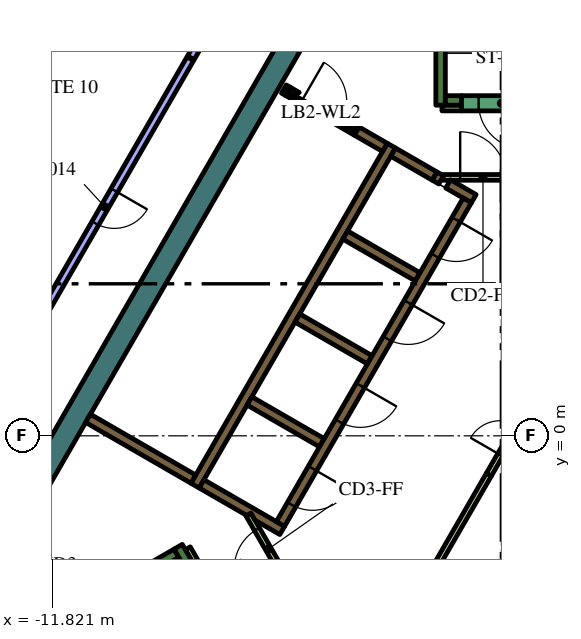
"""IFC4 building model, lengths in metres.
Left out: names, types, materials, properties, quantities, classifications, styles, units other than length and angle.
Written with IfcOpenShell. Run it as: python <this file> out.ifc"""

import sys

from ifc_helpers import new_model, si_unit, direction, frame, frame_2d, origin, place, context, subcontext, project, spatial, polyline, rectangle, outline, extrude, element, fill, save


model = new_model("IFC4")
c1 = context("Model", 3, precision=1e-05, world=origin(), true_north=direction((0.0, 1.0)))
c2 = subcontext(c1, "Body", "Model", "MODEL_VIEW")
j1 = project(units=[si_unit("LENGTHUNIT", "METRE"), si_unit("PLANEANGLEUNIT", "RADIAN")], contexts=[c1])
p1 = place(None, origin())
s1 = spatial("IfcSite", under=j1, at=p1, CompositionType="ELEMENT")
p2 = place(p1, origin())
s2 = spatial("IfcBuilding", under=s1, at=p2, CompositionType="ELEMENT")
p3 = place(p2, frame((0.0, 0.0, 309.0)))
s3 = spatial("IfcBuildingStorey", under=s2, at=p3, CompositionType="ELEMENT", Elevation=309.0)
p4 = place(p3, frame((-12.582, -1.892, 0.0), z_axis=(0.0, 0.0, 1.0), x_axis=(0.500003640647, 0.866023301845, 0.0)))
e1 = element("IfcWall", 1, at=p4, inside=s3, PredefinedType="SOLIDWALL", context=c2, shape_type="SweptSolid", body=[
    extrude(rectangle(XDim=15.858, YDim=0.6, at=frame_2d((7.929, 0.0))), origin(), (0.0, 0.0, 1.0), 4.2),
])
p5 = place(p3, frame((-1.6, 8.7, 0.0), z_axis=(0.0, 0.0, 1.0), x_axis=(0.0, 1.0, 0.0)))
e2 = element("IfcWall", 2, at=p5, inside=s3, PredefinedType="SOLIDWALL", context=c2, shape_type="SweptSolid", body=[
    extrude(rectangle(XDim=7.05, YDim=0.25, at=frame_2d((3.525, 0.0))), origin(), (0.0, 0.0, 1.0), 4.2),
])
p6 = place(p3, frame((-1.475, 8.825, 0.0), z_axis=(0.0, 0.0, 1.0), x_axis=(1.0, 0.0, 0.0)))
e3 = element("IfcWall", 3, at=p6, inside=s3, PredefinedType="SOLIDWALL", context=c2, shape_type="SweptSolid", body=[
    extrude(rectangle(XDim=0.425, YDim=0.25, at=frame_2d((0.212, 0.0))), origin(), (0.0, 0.0, 1.0), 4.2),
])
p7 = place(p3, frame((-14.44, -6.49, 0.0), z_axis=(0.0, 0.0, 1.0), x_axis=(0.866022966069, 0.500004222222, 0.0)))
e4 = element("IfcWall", 4, at=p7, inside=s3, PredefinedType="SOLIDWALL", context=c2, shape_type="SweptSolid", body=[
    extrude(rectangle(XDim=6.8, YDim=0.25, at=frame_2d((3.4, 0.0))), origin(), (0.0, 0.0, 1.0), 4.2),
])
p8 = place(p3, frame((-8.168, -3.503, 0.0), z_axis=(0.0, 0.0, 1.0), x_axis=(-0.499952099219, 0.866053057547, 0.0)))
e5 = element("IfcWall", 5, at=p8, inside=s3, PredefinedType="SOLIDWALL", context=c2, shape_type="SweptSolid", body=[
    extrude(rectangle(XDim=0.675, YDim=0.25, at=frame_2d((0.337, 0.0))), origin(), (0.0, 0.0, 1.0), 4.2),
])
p9 = place(p3, frame((-8.06, -1.311, 0.0), z_axis=(0.0, 0.0, 1.0), x_axis=(0.50000273126, 0.866023826885, 0.0)))
e6 = element("IfcWall", 6, at=p9, inside=s3, PredefinedType="SOLIDWALL", context=c2, shape_type="SweptSolid", body=[
    extrude(rectangle(XDim=10.33, YDim=0.25, at=frame_2d((5.165, 0.0))), origin(), (0.0, 0.0, 1.0), 4.2),
])
p10 = place(p3, frame((-1.758, 6.835, 0.0), z_axis=(0.0, 0.0, 1.0), x_axis=(0.865982457891, -0.500074377092, 0.0)))
e7 = element("IfcWall", 7, at=p10, inside=s3, PredefinedType="SOLIDWALL", context=c2, shape_type="SweptSolid", body=[
    extrude(rectangle(XDim=0.2, YDim=0.25, at=frame_2d((0.1, 0.0))), origin(), (0.0, 0.0, 1.0), 4.2),
])
p11 = place(p3, frame((-1.76, 6.836, 0.0), z_axis=(0.0, 0.0, 1.0), x_axis=(-0.865952863304, 0.500125622755, 0.0)))
e8 = element("IfcWall", 8, at=p11, inside=s3, PredefinedType="SOLIDWALL", context=c2, shape_type="SweptSolid", body=[
    extrude(rectangle(XDim=1.258, YDim=0.25, at=frame_2d((0.629, 0.0))), origin(), (0.0, 0.0, 1.0), 4.2),
])
p12 = place(p3, frame((-0.728, 6.24, 0.0), z_axis=(0.0, 0.0, 1.0), x_axis=(-0.865955664968, 0.500120771724, 0.0)))
e9 = element("IfcWall", 9, at=p12, inside=s3, PredefinedType="SOLIDWALL", context=c2, shape_type="SweptSolid", body=[
    extrude(rectangle(XDim=0.778, YDim=0.25, at=frame_2d((0.389, 0.0))), origin(), (0.0, 0.0, 1.0), 4.2),
])
for number, where, z_axis, x_axis in (
    (10, (-2.204, 4.182, 0.0), (0.0, 0.0, 1.0), (-0.866, 0.5, 0.0)),
    (11, (-5.369, 3.1, 0.0), (0.0, 0.0, 1.0), (0.866, -0.5, 0.0)),
    (12, (-4.724, -0.182, 0.0), (0.0, 0.0, 1.0), (-0.866, 0.5, 0.0)),
):
    element("IfcWall", number, at=place(p3, frame(where, z_axis=z_axis, x_axis=x_axis)), inside=s3, PredefinedType="SOLIDWALL", context=c2, shape_type="SweptSolid", body=[
        extrude(rectangle(XDim=2.2, YDim=0.25, at=frame_2d((1.1, 0.0))), origin(), (0.0, 0.0, 1.0), 4.2),
    ])
p13 = place(p3, origin())
e13 = element("IfcWall", 13, at=p13, inside=s3, PredefinedType="SOLIDWALL", context=c2, shape_type="SweptSolid", body=[
    extrude(outline(polyline([(-5.922, -2.257), (-5.922, -2.257), (-5.705, -2.382), (-5.83, -2.598), (-6.483, -2.221), (-6.591, -2.033), (-6.591, -2.033), (-6.7, -2.096), (-7.952, -1.373), (-7.827, -1.156), (-5.922, -2.257)])), origin(), (0.0, 0.0, 1.0), 4.2),
])
p14 = place(p3, frame((-8.106, -1.14, 0.0), z_axis=(0.0, 0.0, 1.0), x_axis=(-0.866008981251, 0.500028443584, 0.0)))
e14 = element("IfcWall", 14, at=p14, inside=s3, PredefinedType="SOLIDWALL", context=c2, shape_type="SweptSolid", body=[
    extrude(rectangle(XDim=3.2, YDim=0.25, at=frame_2d((1.6, 0.0))), origin(), (0.0, 0.0, 1.0), 4.2),
])
p15 = place(p3, frame((-5.725, 9.125, 0.0), z_axis=(0.0, 0.0, 1.0), x_axis=(0.866185586049, -0.49972245349, 0.0)))
e15 = element("IfcWall", 15, at=p15, inside=s3, PredefinedType="SOLIDWALL", context=c2, shape_type="SweptSolid", body=[
    extrude(rectangle(XDim=0.11, YDim=0.25, at=frame_2d((0.055, 0.0))), origin(), (0.0, 0.0, 1.0), 4.2),
])
p16 = place(p3, frame((-3.066, 7.59, 0.0), z_axis=(0.0, 0.0, 1.0), x_axis=(-0.866081358704, 0.49990307071, 0.0)))
e16 = element("IfcWall", 16, at=p16, inside=s3, PredefinedType="SOLIDWALL", context=c2, shape_type="SweptSolid", body=[
    extrude(rectangle(XDim=0.858, YDim=0.25, at=frame_2d((0.429, 0.0))), origin(), (0.0, 0.0, 1.0), 4.2),
])
e17 = element("IfcWall", 17, at=p13, inside=s3, PredefinedType="SOLIDWALL", context=c2, shape_type="SweptSolid", body=[
    extrude(outline(polyline([(-3.748, 8.128), (-3.813, 8.015), (-4.027, 8.139), (-4.017, 8.156), (-4.008, 8.173), (-4.0, 8.192), (-3.995, 8.21), (-3.991, 8.23), (-3.99, 8.25), (-3.99, 8.268), (-3.748, 8.128)])), origin(), (0.0, 0.0, 1.0), 4.2),
])
e18 = element("IfcWall", 18, at=p13, inside=s3, PredefinedType="SOLIDWALL", context=c2, shape_type="SweptSolid", body=[
    extrude(outline(polyline([(-5.689, 8.96), (-5.69, 8.961), (-5.565, 9.177), (-5.319, 9.035), (-5.335, 9.026), (-5.351, 9.015), (-5.366, 9.002), (-5.379, 8.988), (-5.392, 8.972), (-5.402, 8.956), (-5.412, 8.939), (-5.629, 9.064), (-5.629, 9.064), (-5.689, 8.96)])), origin(), (0.0, 0.0, 1.0), 4.2),
])
for number, where, z_axis, x_axis in (
    (19, (-8.252, -2.958, 0.0), (0.0, 0.0, 1.0), (0.5, -0.866, 0.0)),
    (20, (-1.564, 8.625, 0.0), (0.0, 0.0, 1.0), (1.0, 0.0, 0.0)),
):
    element("IfcWall", number, at=place(p3, frame(where, z_axis=z_axis, x_axis=x_axis)), inside=s3, PredefinedType="PARTITIONING", context=c2, shape_type="SweptSolid", body=[
        extrude(rectangle(XDim=0.514, YDim=0.15, at=frame_2d((0.257, 0.0))), origin(), (0.0, 0.0, 1.0), 3.55),
    ])
p17 = place(p3, frame((-1.887, -3.718, 0.0), z_axis=(0.0, 0.0, 1.0), x_axis=(0.500043732237, 0.866000153493, 0.0)))
e21 = element("IfcWall", 21, at=p17, inside=s3, PredefinedType="PARTITIONING", context=c2, shape_type="SweptSolid", body=[
    extrude(rectangle(XDim=3.114, YDim=0.15, at=frame_2d((1.557, 0.0))), origin(), (0.0, 0.0, 1.0), 3.55),
])
p18 = place(p3, frame((-0.898, 6.194, 0.0), z_axis=(0.0, 0.0, 1.0), x_axis=(-0.499996202215, -0.866027596426, 0.0)))
e22 = element("IfcWall", 22, at=p18, inside=s3, PredefinedType="SOLIDWALL", context=c2, shape_type="SweptSolid", body=[
    extrude(rectangle(XDim=9.83, YDim=0.25, at=frame_2d((4.915, 0.0))), origin(), (0.0, 0.0, 1.0), 4.2),
])
p19 = place(p18, frame((0.585, 0.0, 0.0)))
e23 = element("IfcOpeningElement", 23, at=p19, cuts=e22, PredefinedType="OPENING", context=c2, shape_type="SweptSolid", body=[
    extrude(rectangle(XDim=1.1, YDim=2.1, at=frame_2d((0.55, 1.05))), frame((0.0, 0.135, 0.0), z_axis=(0.0, -1.0, 0.0), x_axis=(1.0, 0.0, 0.0)), (0.0, 0.0, 1.0), 0.27),
])
p20 = place(p18, frame((3.105, 0.0, 0.0)))
e24 = element("IfcOpeningElement", 24, at=p20, cuts=e22, PredefinedType="OPENING", context=c2, shape_type="SweptSolid", body=[
    extrude(rectangle(XDim=1.1, YDim=2.1, at=frame_2d((0.55, 1.05))), frame((0.0, 0.135, 0.0), z_axis=(0.0, -1.0, 0.0), x_axis=(1.0, 0.0, 0.0)), (0.0, 0.0, 1.0), 0.27),
])
p21 = place(p18, frame((5.625, 0.0, 0.0)))
e25 = element("IfcOpeningElement", 25, at=p21, cuts=e22, PredefinedType="OPENING", context=c2, shape_type="SweptSolid", body=[
    extrude(rectangle(XDim=1.1, YDim=2.1, at=frame_2d((0.55, 1.05))), frame((0.0, 0.135, 0.0), z_axis=(0.0, -1.0, 0.0), x_axis=(1.0, 0.0, 0.0)), (0.0, 0.0, 1.0), 0.27),
])
p22 = place(p18, frame((8.145, 0.0, 0.0)))
e26 = element("IfcOpeningElement", 26, at=p22, cuts=e22, PredefinedType="OPENING", context=c2, shape_type="SweptSolid", body=[
    extrude(rectangle(XDim=1.1, YDim=2.1, at=frame_2d((0.55, 1.05))), frame((0.0, 0.135, 0.0), z_axis=(0.0, -1.0, 0.0), x_axis=(1.0, 0.0, 0.0)), (0.0, 0.0, 1.0), 0.27),
])
p23 = place(p3, frame((1.05, 8.75, 0.0), z_axis=(0.0, 0.0, 1.0), x_axis=(-1.0, 0.0, 0.0)))
e27 = element("IfcWall", 27, at=p23, inside=s3, PredefinedType="SOLIDWALL", context=c2, shape_type="SweptSolid", body=[
    extrude(rectangle(XDim=2.1, YDim=0.4, at=frame_2d((1.05, 0.0))), origin(), (0.0, 0.0, 1.0), 4.2),
])
p24 = place(p23, frame((0.45, 0.0, 0.0)))
e28 = element("IfcOpeningElement", 28, at=p24, cuts=e27, PredefinedType="OPENING", context=c2, shape_type="SweptSolid", body=[
    extrude(rectangle(XDim=1.2, YDim=2.1, at=frame_2d((0.6, 1.05))), frame((0.0, 0.21, 0.0), z_axis=(0.0, -1.0, 0.0), x_axis=(1.0, 0.0, 0.0)), (0.0, 0.0, 1.0), 0.42),
])
p25 = place(p3, frame((-0.33, -1.022, 0.0), z_axis=(0.0, 0.0, 1.0), x_axis=(0.500027713859, 0.866009402589, 0.0)))
e29 = element("IfcWall", 29, at=p25, inside=s3, PredefinedType="PARTITIONING", context=c2, shape_type="SweptSolid", body=[
    extrude(rectangle(XDim=2.1, YDim=0.15, at=frame_2d((1.05, 0.0))), origin(), (0.0, 0.0, 1.0), 3.55),
])
p26 = place(p25, frame((0.6, 0.0, 0.0)))
e30 = element("IfcOpeningElement", 30, at=p26, cuts=e29, PredefinedType="OPENING", context=c2, shape_type="SweptSolid", body=[
    extrude(rectangle(XDim=0.9, YDim=2.1, at=frame_2d((0.45, 1.05))), frame((0.0, 0.085, 0.0), z_axis=(0.0, -1.0, 0.0), x_axis=(1.0, 0.0, 0.0)), (0.0, 0.0, 1.0), 0.17),
])
p27 = place(p3, frame((-1.534, 6.8, 0.0), z_axis=(0.0, 0.0, 1.0), x_axis=(1.0, 0.0, 0.0)))
e31 = element("IfcWall", 31, at=p27, inside=s3, PredefinedType="PARTITIONING", context=c2, shape_type="SweptSolid", body=[
    extrude(rectangle(XDim=2.1, YDim=0.15, at=frame_2d((1.05, 0.0))), origin(), (0.0, 0.0, 1.0), 3.55),
])
p28 = place(p27, frame((0.45, 0.0, 0.0)))
e32 = element("IfcOpeningElement", 32, at=p28, cuts=e31, PredefinedType="OPENING", context=c2, shape_type="SweptSolid", body=[
    extrude(rectangle(XDim=1.2, YDim=2.1, at=frame_2d((0.6, 1.05))), frame((0.0, 0.085, 0.0), z_axis=(0.0, -1.0, 0.0), x_axis=(1.0, 0.0, 0.0)), (0.0, 0.0, 1.0), 0.17),
])
p29 = place(p3, frame((-5.606, -3.89, 0.0), z_axis=(0.0, 0.0, 1.0), x_axis=(-0.500027713859, 0.866009402589, 0.0)))
e33 = element("IfcWall", 33, at=p29, inside=s3, PredefinedType="PARTITIONING", context=c2, shape_type="SweptSolid", body=[
    extrude(rectangle(XDim=2.1, YDim=0.15, at=frame_2d((1.05, 0.0))), origin(), (0.0, 0.0, 1.0), 3.55),
])
p30 = place(p29, frame((0.45, 0.0, 0.0)))
e34 = element("IfcOpeningElement", 34, at=p30, cuts=e33, PredefinedType="OPENING", context=c2, shape_type="SweptSolid", body=[
    extrude(rectangle(XDim=1.2, YDim=2.1, at=frame_2d((0.6, 1.05))), frame((0.0, 0.085, 0.0), z_axis=(0.0, -1.0, 0.0), x_axis=(1.0, 0.0, 0.0)), (0.0, 0.0, 1.0), 0.17),
])
p31 = place(p3, frame((-5.659, 9.012, 0.0), z_axis=(0.0, 0.0, 1.0), x_axis=(0.866009402589, -0.500027713859, 0.0)))
e35 = element("IfcWall", 35, at=p31, inside=s3, PredefinedType="PARTITIONING", context=c2, shape_type="SweptSolid", body=[
    extrude(rectangle(XDim=2.1, YDim=0.12, at=frame_2d((1.05, 0.0))), origin(), (0.0, 0.0, 1.0), 3.55),
])
p32 = place(p31, frame((0.45, 0.0, 0.0)))
e36 = element("IfcOpeningElement", 36, at=p32, cuts=e35, PredefinedType="OPENING", context=c2, shape_type="SweptSolid", body=[
    extrude(rectangle(XDim=1.2, YDim=2.1, at=frame_2d((0.6, 1.05))), frame((0.0, 0.07, 0.0), z_axis=(0.0, -1.0, 0.0), x_axis=(1.0, 0.0, 0.0)), (0.0, 0.0, 1.0), 0.14),
])
p33 = place(p3, frame((-8.186, 9.922, 0.0), z_axis=(0.0, 0.0, 1.0), x_axis=(-0.5000018851, -0.866024315419, 0.0)))
e37 = element("IfcWall", 37, at=p33, inside=s3, PredefinedType="PARTITIONING", context=c2, shape_type="SweptSolid", body=[
    extrude(rectangle(XDim=9.0, YDim=0.2, at=frame_2d((4.5, 0.0))), origin(), (0.0, 0.0, 1.0), 3.55),
])
p34 = place(p33, frame((4.0, 0.0, 0.0)))
e38 = element("IfcOpeningElement", 38, at=p34, cuts=e37, PredefinedType="OPENING", context=c2, shape_type="SweptSolid", body=[
    extrude(rectangle(XDim=1.0, YDim=2.1, at=frame_2d((0.5, 1.05))), frame((0.0, 0.11, 0.0), z_axis=(0.0, -1.0, 0.0), x_axis=(1.0, 0.0, 0.0)), (0.0, 0.0, 1.0), 0.22),
])
p35 = place(p3, frame((-7.275, 11.499, 0.0), z_axis=(0.0, 0.0, 1.0), x_axis=(-0.500025407441, -0.866010734295, 0.0)))
e39 = element("IfcWall", 39, at=p35, inside=s3, PredefinedType="PARTITIONING", context=c2, shape_type="SweptSolid", body=[
    extrude(rectangle(XDim=1.791, YDim=0.2, at=frame_2d((0.895, 0.0))), origin(), (0.0, 0.0, 1.0), 3.55),
])
p36 = place(p19, origin())
e40 = element("IfcDoor", 40, at=p36, inside=s3, OperationType="DOUBLE_DOOR_SLIDING", PredefinedType="DOOR", context=c2, shape_type="SweptSolid", body=[
    extrude(rectangle(XDim=1.1, YDim=2.1, at=frame_2d((0.55, 1.05))), frame((0.0, 0.025, 0.0), z_axis=(0.0, -1.0, 0.0), x_axis=(1.0, 0.0, 0.0)), (0.0, 0.0, 1.0), 0.05),
])
fill(e23, e40)
p37 = place(p20, origin())
e41 = element("IfcDoor", 41, at=p37, inside=s3, OperationType="DOUBLE_DOOR_SLIDING", PredefinedType="DOOR", context=c2, shape_type="SweptSolid", body=[
    extrude(rectangle(XDim=1.1, YDim=2.1, at=frame_2d((0.55, 1.05))), frame((0.0, 0.025, 0.0), z_axis=(0.0, -1.0, 0.0), x_axis=(1.0, 0.0, 0.0)), (0.0, 0.0, 1.0), 0.05),
])
fill(e24, e41)
p38 = place(p21, origin())
e42 = element("IfcDoor", 42, at=p38, inside=s3, OperationType="DOUBLE_DOOR_SLIDING", PredefinedType="DOOR", context=c2, shape_type="SweptSolid", body=[
    extrude(rectangle(XDim=1.1, YDim=2.1, at=frame_2d((0.55, 1.05))), frame((0.0, 0.025, 0.0), z_axis=(0.0, -1.0, 0.0), x_axis=(1.0, 0.0, 0.0)), (0.0, 0.0, 1.0), 0.05),
])
fill(e25, e42)
p39 = place(p22, origin())
e43 = element("IfcDoor", 43, at=p39, inside=s3, OperationType="DOUBLE_DOOR_SLIDING", PredefinedType="DOOR", context=c2, shape_type="SweptSolid", body=[
    extrude(rectangle(XDim=1.1, YDim=2.1, at=frame_2d((0.55, 1.05))), frame((0.0, 0.025, 0.0), z_axis=(0.0, -1.0, 0.0), x_axis=(1.0, 0.0, 0.0)), (0.0, 0.0, 1.0), 0.05),
])
fill(e26, e43)
p40 = place(p24, origin())
e44 = element("IfcDoor", 44, at=p40, inside=s3, OperationType="SINGLE_SWING_LEFT", PredefinedType="DOOR", context=c2, shape_type="SweptSolid", body=[
    extrude(rectangle(XDim=1.2, YDim=2.1, at=frame_2d((0.6, 1.05))), frame((0.0, 0.025, 0.0), z_axis=(0.0, -1.0, 0.0), x_axis=(1.0, 0.0, 0.0)), (0.0, 0.0, 1.0), 0.05),
])
fill(e28, e44)
p41 = place(p26, origin())
e45 = element("IfcDoor", 45, at=p41, inside=s3, OperationType="SINGLE_SWING_LEFT", PredefinedType="DOOR", context=c2, shape_type="SweptSolid", body=[
    extrude(rectangle(XDim=0.9, YDim=2.1, at=frame_2d((0.45, 1.05))), frame((0.0, 0.025, 0.0), z_axis=(0.0, -1.0, 0.0), x_axis=(1.0, 0.0, 0.0)), (0.0, 0.0, 1.0), 0.05),
])
fill(e30, e45)
p42 = place(p28, origin())
e46 = element("IfcDoor", 46, at=p42, inside=s3, OperationType="SINGLE_SWING_LEFT", PredefinedType="DOOR", context=c2, shape_type="SweptSolid", body=[
    extrude(rectangle(XDim=1.2, YDim=2.1, at=frame_2d((0.6, 1.05))), frame((0.0, 0.025, 0.0), z_axis=(0.0, -1.0, 0.0), x_axis=(1.0, 0.0, 0.0)), (0.0, 0.0, 1.0), 0.05),
])
fill(e32, e46)
p43 = place(p30, origin())
e47 = element("IfcDoor", 47, at=p43, inside=s3, OperationType="SINGLE_SWING_LEFT", PredefinedType="DOOR", context=c2, shape_type="SweptSolid", body=[
    extrude(rectangle(XDim=1.2, YDim=2.1, at=frame_2d((0.6, 1.05))), frame((0.0, 0.025, 0.0), z_axis=(0.0, -1.0, 0.0), x_axis=(1.0, 0.0, 0.0)), (0.0, 0.0, 1.0), 0.05),
])
fill(e34, e47)
p44 = place(p32, origin())
e48 = element("IfcDoor", 48, at=p44, inside=s3, OperationType="SINGLE_SWING_LEFT", PredefinedType="DOOR", context=c2, shape_type="SweptSolid", body=[
    extrude(rectangle(XDim=1.2, YDim=2.1, at=frame_2d((0.6, 1.05))), frame((0.0, 0.025, 0.0), z_axis=(0.0, -1.0, 0.0), x_axis=(1.0, 0.0, 0.0)), (0.0, 0.0, 1.0), 0.05),
])
fill(e36, e48)
p45 = place(p34, origin())
e49 = element("IfcDoor", 49, at=p45, inside=s3, OperationType="SINGLE_SWING_LEFT", PredefinedType="DOOR", context=c2, shape_type="SweptSolid", body=[
    extrude(rectangle(XDim=1.0, YDim=2.1, at=frame_2d((0.5, 1.05))), frame((0.0, 0.025, 0.0), z_axis=(0.0, -1.0, 0.0), x_axis=(1.0, 0.0, 0.0)), (0.0, 0.0, 1.0), 0.05),
])
fill(e38, e49)
save(model, sys.argv[1])
